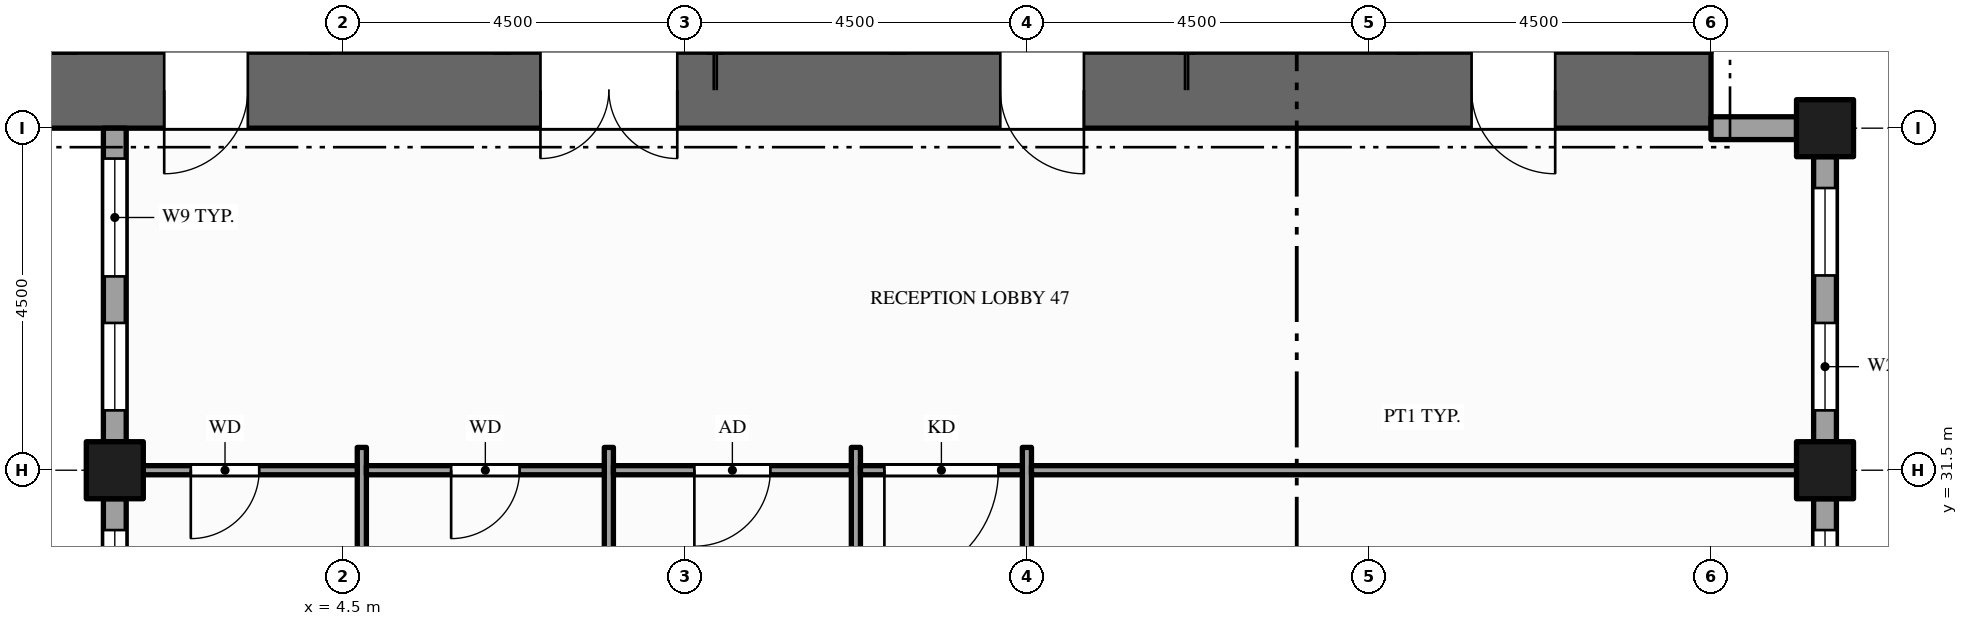
"""IFC4 building model, lengths in metres.
Left out: names, types, materials, properties, quantities, classifications, styles, units other than length and angle.
Written with IfcOpenShell. Run it as: python <this file> out.ifc"""

import sys

from ifc_helpers import new_model, si_unit, direction, frame, frame_2d, origin, origin_2d, place, context, subcontext, project, spatial, rectangle, hollow_rectangle, extrude, element, fill, save


model = new_model("IFC4")
c1 = context("Model", 3, precision=1e-05, world=origin(), true_north=direction((0.0, 1.0)))
c2 = subcontext(c1, "Body", "Model", "MODEL_VIEW")
j1 = project(units=[si_unit("LENGTHUNIT", "METRE"), si_unit("PLANEANGLEUNIT", "RADIAN")], contexts=[c1])
p1 = place(None, origin())
s1 = spatial("IfcSite", under=j1, at=p1, CompositionType="ELEMENT")
p2 = place(p1, origin())
s2 = spatial("IfcBuilding", under=s1, at=p2, CompositionType="ELEMENT")
p3 = place(p2, frame((0.0, 0.0, 211.0)))
s3 = spatial("IfcBuildingStorey", under=s2, at=p3, CompositionType="ELEMENT", Elevation=211.0)
p4 = place(p3, frame((0.0, 36.5, -0.15), z_axis=(0.0, 0.0, 1.0), x_axis=(1.0, 0.0, 0.0)))
e1 = element("IfcWall", 1, at=p4, inside=s3, PredefinedType="SHEAR", context=c2, shape_type="SweptSolid", body=[
    extrude(rectangle(XDim=22.5, YDim=1.0, at=frame_2d((11.25, 0.0))), origin(), (0.0, 0.0, 1.0), 4.0),
])
p5 = place(p4, frame((7.1, 0.0, 0.15)))
e2 = element("IfcOpeningElement", 2, at=p5, cuts=e1, PredefinedType="OPENING", context=c2, shape_type="SweptSolid", body=[
    extrude(rectangle(XDim=1.8, YDim=2.1, at=frame_2d((0.9, 1.05))), frame((0.0, 0.51, 0.0), z_axis=(0.0, -1.0, 0.0), x_axis=(1.0, 0.0, 0.0)), (0.0, 0.0, 1.0), 1.02),
])
p6 = place(p4, frame((13.15, 0.0, 0.15)))
e3 = element("IfcOpeningElement", 3, at=p6, cuts=e1, PredefinedType="OPENING", context=c2, shape_type="SweptSolid", body=[
    extrude(rectangle(XDim=1.1, YDim=2.1, at=frame_2d((0.55, 1.05))), frame((0.0, 0.51, 0.0), z_axis=(0.0, -1.0, 0.0), x_axis=(1.0, 0.0, 0.0)), (0.0, 0.0, 1.0), 1.02),
])
p7 = place(p4, frame((2.15, 0.0, 0.15)))
e4 = element("IfcOpeningElement", 4, at=p7, cuts=e1, PredefinedType="OPENING", context=c2, shape_type="SweptSolid", body=[
    extrude(rectangle(XDim=1.1, YDim=2.1, at=frame_2d((0.55, 1.05))), frame((0.0, 0.51, 0.0), z_axis=(0.0, -1.0, 0.0), x_axis=(1.0, 0.0, 0.0)), (0.0, 0.0, 1.0), 1.02),
])
p8 = place(p4, frame((19.35, 0.0, 0.15)))
e5 = element("IfcOpeningElement", 5, at=p8, cuts=e1, PredefinedType="OPENING", context=c2, shape_type="SweptSolid", body=[
    extrude(rectangle(XDim=1.1, YDim=2.1, at=frame_2d((0.55, 1.05))), frame((0.0, 0.51, 0.0), z_axis=(0.0, -1.0, 0.0), x_axis=(1.0, 0.0, 0.0)), (0.0, 0.0, 1.0), 1.02),
])
for number, where, z_axis, x_axis in (
    (6, (1.5, 31.5, -0.15), (0.0, 0.0, 1.0), (1.0, 0.0, 0.0)),
    (7, (24.0, 31.5, -0.15), (0.0, 0.0, 1.0), (1.0, 0.0, 0.0)),
    (8, (24.0, 36.0, -0.15), (0.0, 0.0, 1.0), (1.0, 0.0, 0.0)),
):
    element("IfcColumn", number, at=place(p3, frame(where, z_axis=z_axis, x_axis=x_axis)), inside=s3, PredefinedType="COLUMN", context=c2, shape_type="SweptSolid", body=[
        extrude(hollow_rectangle(XDim=0.75, YDim=0.75, WallThickness=0.036, at=origin_2d()), origin(), (0.0, 0.0, 1.0), 4.0),
    ])
p9 = place(p3, frame((24.0, 25.875, 0.0), z_axis=(0.0, 0.0, 1.0), x_axis=(0.0, 1.0, 0.0)))
e9 = element("IfcWall", 9, at=p9, inside=s3, PredefinedType="STANDARD", context=c2, shape_type="SweptSolid", body=[
    extrude(rectangle(XDim=5.25, YDim=0.3, at=frame_2d((2.625, 0.0))), origin(), (0.0, 0.0, 1.0), 3.157),
])
p10 = place(p9, frame((1.425, 0.0, 0.9)))
e10 = element("IfcOpeningElement", 10, at=p10, cuts=e9, PredefinedType="OPENING", context=c2, shape_type="SweptSolid", body=[
    extrude(rectangle(XDim=1.65, YDim=2.0, at=frame_2d((0.825, 1.0))), frame((0.0, 0.16, 0.0), z_axis=(0.0, -1.0, 0.0), x_axis=(1.0, 0.0, 0.0)), (0.0, 0.0, 1.0), 0.32),
])
p11 = place(p9, frame((3.688, 0.0, 0.9)))
e11 = element("IfcOpeningElement", 11, at=p11, cuts=e9, PredefinedType="OPENING", context=c2, shape_type="SweptSolid", body=[
    extrude(rectangle(XDim=1.15, YDim=2.0, at=frame_2d((0.575, 1.0))), frame((0.0, 0.16, 0.0), z_axis=(0.0, -1.0, 0.0), x_axis=(1.0, 0.0, 0.0)), (0.0, 0.0, 1.0), 0.32),
])
p12 = place(p3, frame((24.0, 31.875, 0.0), z_axis=(0.0, 0.0, 1.0), x_axis=(0.0, 1.0, 0.0)))
e12 = element("IfcWall", 12, at=p12, inside=s3, PredefinedType="STANDARD", context=c2, shape_type="SweptSolid", body=[
    extrude(rectangle(XDim=3.75, YDim=0.3, at=frame_2d((1.875, 0.0))), origin(), (0.0, 0.0, 1.0), 3.157),
])
p13 = place(p12, frame((0.413, 0.0, 0.9)))
e13 = element("IfcOpeningElement", 13, at=p13, cuts=e12, PredefinedType="OPENING", context=c2, shape_type="SweptSolid", body=[
    extrude(rectangle(XDim=1.15, YDim=2.0, at=frame_2d((0.575, 1.0))), frame((0.0, 0.16, 0.0), z_axis=(0.0, -1.0, 0.0), x_axis=(1.0, 0.0, 0.0)), (0.0, 0.0, 1.0), 0.32),
])
p14 = place(p12, frame((2.188, 0.0, 0.9)))
e14 = element("IfcOpeningElement", 14, at=p14, cuts=e12, PredefinedType="OPENING", context=c2, shape_type="SweptSolid", body=[
    extrude(rectangle(XDim=1.15, YDim=2.0, at=frame_2d((0.575, 1.0))), frame((0.0, 0.16, 0.0), z_axis=(0.0, -1.0, 0.0), x_axis=(1.0, 0.0, 0.0)), (0.0, 0.0, 1.0), 0.32),
])
p15 = place(p3, frame((23.625, 36.0, 0.0), z_axis=(0.0, 0.0, 1.0), x_axis=(-1.0, 0.0, 0.0)))
e15 = element("IfcWall", 15, at=p15, inside=s3, PredefinedType="STANDARD", context=c2, shape_type="SweptSolid", body=[
    extrude(rectangle(XDim=1.125, YDim=0.3, at=frame_2d((0.562, 0.0))), origin(), (0.0, 0.0, 1.0), 2.87),
])
p16 = place(p3, frame((1.5, 36.0, 0.0), z_axis=(0.0, 0.0, 1.0), x_axis=(0.0, -1.0, 0.0)))
e16 = element("IfcWall", 16, at=p16, inside=s3, PredefinedType="STANDARD", context=c2, shape_type="SweptSolid", body=[
    extrude(rectangle(XDim=4.125, YDim=0.3, at=frame_2d((2.062, 0.0))), origin(), (0.0, 0.0, 1.0), 3.157),
])
p17 = place(p16, frame((0.4, 0.0, 0.9)))
e17 = element("IfcOpeningElement", 17, at=p17, cuts=e16, PredefinedType="OPENING", context=c2, shape_type="SweptSolid", body=[
    extrude(rectangle(XDim=1.55, YDim=2.0, at=frame_2d((0.775, 1.0))), frame((0.0, 0.16, 0.0), z_axis=(0.0, -1.0, 0.0), x_axis=(1.0, 0.0, 0.0)), (0.0, 0.0, 1.0), 0.32),
])
p18 = place(p16, frame((2.562, 0.0, 0.9)))
e18 = element("IfcOpeningElement", 18, at=p18, cuts=e16, PredefinedType="OPENING", context=c2, shape_type="SweptSolid", body=[
    extrude(rectangle(XDim=1.15, YDim=2.0, at=frame_2d((0.575, 1.0))), frame((0.0, 0.16, 0.0), z_axis=(0.0, -1.0, 0.0), x_axis=(1.0, 0.0, 0.0)), (0.0, 0.0, 1.0), 0.32),
])
p19 = place(p3, frame((1.5, 31.125, 0.0), z_axis=(0.0, 0.0, 1.0), x_axis=(0.0, -1.0, 0.0)))
e19 = element("IfcWall", 19, at=p19, inside=s3, PredefinedType="STANDARD", context=c2, shape_type="SweptSolid", body=[
    extrude(rectangle(XDim=3.75, YDim=0.3, at=frame_2d((1.875, 0.0))), origin(), (0.0, 0.0, 1.0), 3.157),
])
p20 = place(p19, frame((0.413, 0.0, 0.9)))
e20 = element("IfcOpeningElement", 20, at=p20, cuts=e19, PredefinedType="OPENING", context=c2, shape_type="SweptSolid", body=[
    extrude(rectangle(XDim=1.15, YDim=2.0, at=frame_2d((0.575, 1.0))), frame((0.0, 0.16, 0.0), z_axis=(0.0, -1.0, 0.0), x_axis=(1.0, 0.0, 0.0)), (0.0, 0.0, 1.0), 0.32),
])
p21 = place(p19, frame((2.188, 0.0, 0.9)))
e21 = element("IfcOpeningElement", 21, at=p21, cuts=e19, PredefinedType="OPENING", context=c2, shape_type="SweptSolid", body=[
    extrude(rectangle(XDim=1.15, YDim=2.0, at=frame_2d((0.575, 1.0))), frame((0.0, 0.16, 0.0), z_axis=(0.0, -1.0, 0.0), x_axis=(1.0, 0.0, 0.0)), (0.0, 0.0, 1.0), 0.32),
])
for number, where, z_axis, x_axis in (
    (22, (4.75, 26.7, 0.0), (0.0, 0.0, 1.0), (0.0, 1.0, 0.0)),
    (23, (8.0, 26.7, 0.0), (0.0, 0.0, 1.0), (0.0, 1.0, 0.0)),
):
    element("IfcWall", number, at=place(p3, frame(where, z_axis=z_axis, x_axis=x_axis)), inside=s3, PredefinedType="PARTITIONING", context=c2, shape_type="SweptSolid", body=[
        extrude(rectangle(XDim=5.1, YDim=0.12, at=frame_2d((2.55, 0.0))), origin(), (0.0, 0.0, 1.0), 3.85),
    ])
p22 = place(p3, frame((11.25, 13.2, 0.0), z_axis=(0.0, 0.0, 1.0), x_axis=(0.0, 1.0, 0.0)))
e24 = element("IfcWall", 24, at=p22, inside=s3, PredefinedType="PARTITIONING", context=c2, shape_type="SweptSolid", body=[
    extrude(rectangle(XDim=18.6, YDim=0.12, at=frame_2d((9.3, 0.0))), origin(), (0.0, 0.0, 1.0), 2.6),
])
p23 = place(p22, frame((3.175, 0.0, 0.0)))
e25 = element("IfcOpeningElement", 25, at=p23, cuts=e24, PredefinedType="OPENING", context=c2, shape_type="SweptSolid", body=[
    extrude(rectangle(XDim=1.0, YDim=2.1, at=frame_2d((0.5, 1.05))), frame((0.0, 0.07, 0.0), z_axis=(0.0, -1.0, 0.0), x_axis=(1.0, 0.0, 0.0)), (0.0, 0.0, 1.0), 0.14),
])
p24 = place(p22, frame((9.955, 0.0, 0.0)))
e26 = element("IfcOpeningElement", 26, at=p24, cuts=e24, PredefinedType="OPENING", context=c2, shape_type="SweptSolid", body=[
    extrude(rectangle(XDim=1.0, YDim=2.1, at=frame_2d((0.5, 1.05))), frame((0.0, 0.07, 0.0), z_axis=(0.0, -1.0, 0.0), x_axis=(1.0, 0.0, 0.0)), (0.0, 0.0, 1.0), 0.14),
])
p25 = place(p3, frame((13.5, 13.2, 0.0), z_axis=(0.0, 0.0, 1.0), x_axis=(0.0, 1.0, 0.0)))
e27 = element("IfcWall", 27, at=p25, inside=s3, PredefinedType="PARTITIONING", context=c2, shape_type="SweptSolid", body=[
    extrude(rectangle(XDim=18.6, YDim=0.12, at=frame_2d((9.3, 0.0))), origin(), (0.0, 0.0, 1.0), 2.6),
])
p26 = place(p25, frame((4.2, 0.0, 0.0)))
e28 = element("IfcOpeningElement", 28, at=p26, cuts=e27, PredefinedType="OPENING", context=c2, shape_type="SweptSolid", body=[
    extrude(rectangle(XDim=1.2, YDim=2.1, at=frame_2d((0.6, 1.05))), frame((0.0, 0.07, 0.0), z_axis=(0.0, -1.0, 0.0), x_axis=(1.0, 0.0, 0.0)), (0.0, 0.0, 1.0), 0.14),
])
p27 = place(p3, frame((1.65, 31.5, 0.0), z_axis=(0.0, 0.0, 1.0), x_axis=(1.0, 0.0, 0.0)))
e29 = element("IfcWall", 29, at=p27, inside=s3, PredefinedType="PARTITIONING", context=c2, shape_type="SweptSolid", body=[
    extrude(rectangle(XDim=3.04, YDim=0.12, at=frame_2d((1.52, 0.0))), origin(), (0.0, 0.0, 1.0), 2.87),
])
p28 = place(p27, frame((0.85, 0.0, 0.0)))
e30 = element("IfcOpeningElement", 30, at=p28, cuts=e29, PredefinedType="OPENING", context=c2, shape_type="SweptSolid", body=[
    extrude(rectangle(XDim=0.9, YDim=2.1, at=frame_2d((0.45, 1.05))), frame((0.0, 0.07, 0.0), z_axis=(0.0, -1.0, 0.0), x_axis=(1.0, 0.0, 0.0)), (0.0, 0.0, 1.0), 0.14),
])
p29 = place(p3, frame((4.81, 31.5, 0.0), z_axis=(0.0, 0.0, 1.0), x_axis=(1.0, 0.0, 0.0)))
e31 = element("IfcWall", 31, at=p29, inside=s3, PredefinedType="PARTITIONING", context=c2, shape_type="SweptSolid", body=[
    extrude(rectangle(XDim=3.13, YDim=0.12, at=frame_2d((1.565, 0.0))), origin(), (0.0, 0.0, 1.0), 2.87),
])
p30 = place(p29, frame((1.115, 0.0, 0.0)))
e32 = element("IfcOpeningElement", 32, at=p30, cuts=e31, PredefinedType="OPENING", context=c2, shape_type="SweptSolid", body=[
    extrude(rectangle(XDim=0.9, YDim=2.1, at=frame_2d((0.45, 1.05))), frame((0.0, 0.07, 0.0), z_axis=(0.0, -1.0, 0.0), x_axis=(1.0, 0.0, 0.0)), (0.0, 0.0, 1.0), 0.14),
])
p31 = place(p3, frame((8.06, 31.5, 0.0), z_axis=(0.0, 0.0, 1.0), x_axis=(1.0, 0.0, 0.0)))
e33 = element("IfcWall", 33, at=p31, inside=s3, PredefinedType="PARTITIONING", context=c2, shape_type="SweptSolid", body=[
    extrude(rectangle(XDim=3.13, YDim=0.12, at=frame_2d((1.565, 0.0))), origin(), (0.0, 0.0, 1.0), 2.87),
])
p32 = place(p31, frame((1.065, 0.0, 0.0)))
e34 = element("IfcOpeningElement", 34, at=p32, cuts=e33, PredefinedType="OPENING", context=c2, shape_type="SweptSolid", body=[
    extrude(rectangle(XDim=1.0, YDim=2.1, at=frame_2d((0.5, 1.05))), frame((0.0, 0.07, 0.0), z_axis=(0.0, -1.0, 0.0), x_axis=(1.0, 0.0, 0.0)), (0.0, 0.0, 1.0), 0.14),
])
p33 = place(p3, frame((11.31, 31.5, 0.0), z_axis=(0.0, 0.0, 1.0), x_axis=(1.0, 0.0, 0.0)))
e35 = element("IfcWall", 35, at=p33, inside=s3, PredefinedType="PARTITIONING", context=c2, shape_type="SweptSolid", body=[
    extrude(rectangle(XDim=2.13, YDim=0.12, at=frame_2d((1.065, 0.0))), origin(), (0.0, 0.0, 1.0), 2.87),
])
p34 = place(p33, frame((0.315, 0.0, 0.0)))
e36 = element("IfcOpeningElement", 36, at=p34, cuts=e35, PredefinedType="OPENING", context=c2, shape_type="SweptSolid", body=[
    extrude(rectangle(XDim=1.5, YDim=2.1, at=frame_2d((0.75, 1.05))), frame((0.0, 0.07, 0.0), z_axis=(0.0, -1.0, 0.0), x_axis=(1.0, 0.0, 0.0)), (0.0, 0.0, 1.0), 0.14),
])
p35 = place(p3, frame((13.56, 31.5, 0.0), z_axis=(0.0, 0.0, 1.0), x_axis=(1.0, 0.0, 0.0)))
e37 = element("IfcWall", 37, at=p35, inside=s3, PredefinedType="PARTITIONING", context=c2, shape_type="SweptSolid", body=[
    extrude(rectangle(XDim=10.29, YDim=0.12, at=frame_2d((5.145, 0.0))), origin(), (0.0, 0.0, 1.0), 2.87),
])
p36 = place(p11, origin())
e38 = element("IfcWindow", 38, at=p36, inside=s3, PartitioningType="SINGLE_PANEL", PredefinedType="WINDOW", context=c2, shape_type="SweptSolid", body=[
    extrude(rectangle(XDim=1.15, YDim=2.0, at=frame_2d((0.575, 1.0))), frame((0.0, 0.03, 0.0), z_axis=(0.0, -1.0, 0.0), x_axis=(1.0, 0.0, 0.0)), (0.0, 0.0, 1.0), 0.06),
])
fill(e11, e38)
p37 = place(p13, origin())
e39 = element("IfcWindow", 39, at=p37, inside=s3, PartitioningType="SINGLE_PANEL", PredefinedType="WINDOW", context=c2, shape_type="SweptSolid", body=[
    extrude(rectangle(XDim=1.15, YDim=2.0, at=frame_2d((0.575, 1.0))), frame((0.0, 0.03, 0.0), z_axis=(0.0, -1.0, 0.0), x_axis=(1.0, 0.0, 0.0)), (0.0, 0.0, 1.0), 0.06),
])
fill(e13, e39)
p38 = place(p14, origin())
e40 = element("IfcWindow", 40, at=p38, inside=s3, PartitioningType="SINGLE_PANEL", PredefinedType="WINDOW", context=c2, shape_type="SweptSolid", body=[
    extrude(rectangle(XDim=1.15, YDim=2.0, at=frame_2d((0.575, 1.0))), frame((0.0, 0.03, 0.0), z_axis=(0.0, -1.0, 0.0), x_axis=(1.0, 0.0, 0.0)), (0.0, 0.0, 1.0), 0.06),
])
fill(e14, e40)
p39 = place(p17, origin())
e41 = element("IfcWindow", 41, at=p39, inside=s3, PartitioningType="SINGLE_PANEL", PredefinedType="WINDOW", context=c2, shape_type="SweptSolid", body=[
    extrude(rectangle(XDim=1.55, YDim=2.0, at=frame_2d((0.775, 1.0))), frame((0.0, 0.03, 0.0), z_axis=(0.0, -1.0, 0.0), x_axis=(1.0, 0.0, 0.0)), (0.0, 0.0, 1.0), 0.06),
])
fill(e17, e41)
p40 = place(p18, origin())
e42 = element("IfcWindow", 42, at=p40, inside=s3, PartitioningType="SINGLE_PANEL", PredefinedType="WINDOW", context=c2, shape_type="SweptSolid", body=[
    extrude(rectangle(XDim=1.15, YDim=2.0, at=frame_2d((0.575, 1.0))), frame((0.0, 0.03, 0.0), z_axis=(0.0, -1.0, 0.0), x_axis=(1.0, 0.0, 0.0)), (0.0, 0.0, 1.0), 0.06),
])
fill(e18, e42)
p41 = place(p20, origin())
e43 = element("IfcWindow", 43, at=p41, inside=s3, PartitioningType="SINGLE_PANEL", PredefinedType="WINDOW", context=c2, shape_type="SweptSolid", body=[
    extrude(rectangle(XDim=1.15, YDim=2.0, at=frame_2d((0.575, 1.0))), frame((0.0, 0.03, 0.0), z_axis=(0.0, -1.0, 0.0), x_axis=(1.0, 0.0, 0.0)), (0.0, 0.0, 1.0), 0.06),
])
fill(e20, e43)
p42 = place(p5, origin())
e44 = element("IfcDoor", 44, at=p42, inside=s3, OperationType="DOUBLE_DOOR_SINGLE_SWING", PredefinedType="DOOR", context=c2, shape_type="SweptSolid", body=[
    extrude(rectangle(XDim=1.8, YDim=2.1, at=frame_2d((0.9, 1.05))), frame((0.0, 0.025, 0.0), z_axis=(0.0, -1.0, 0.0), x_axis=(1.0, 0.0, 0.0)), (0.0, 0.0, 1.0), 0.05),
])
fill(e2, e44)
p43 = place(p6, origin())
e45 = element("IfcDoor", 45, at=p43, inside=s3, OperationType="SINGLE_SWING_RIGHT", PredefinedType="DOOR", context=c2, shape_type="SweptSolid", body=[
    extrude(rectangle(XDim=1.1, YDim=2.1, at=frame_2d((0.55, 1.05))), frame((0.0, 0.025, 0.0), z_axis=(0.0, -1.0, 0.0), x_axis=(1.0, 0.0, 0.0)), (0.0, 0.0, 1.0), 0.05),
])
fill(e3, e45)
p44 = place(p7, origin())
e46 = element("IfcDoor", 46, at=p44, inside=s3, OperationType="SINGLE_SWING_LEFT", PredefinedType="DOOR", context=c2, shape_type="SweptSolid", body=[
    extrude(rectangle(XDim=1.1, YDim=2.1, at=frame_2d((0.55, 1.05))), frame((0.0, 0.025, 0.0), z_axis=(0.0, -1.0, 0.0), x_axis=(1.0, 0.0, 0.0)), (0.0, 0.0, 1.0), 0.05),
])
fill(e4, e46)
p45 = place(p8, origin())
e47 = element("IfcDoor", 47, at=p45, inside=s3, OperationType="SINGLE_SWING_RIGHT", PredefinedType="DOOR", context=c2, shape_type="SweptSolid", body=[
    extrude(rectangle(XDim=1.1, YDim=2.1, at=frame_2d((0.55, 1.05))), frame((0.0, 0.025, 0.0), z_axis=(0.0, -1.0, 0.0), x_axis=(1.0, 0.0, 0.0)), (0.0, 0.0, 1.0), 0.05),
])
fill(e5, e47)
p46 = place(p34, origin())
e48 = element("IfcDoor", 48, at=p46, inside=s3, OperationType="SINGLE_SWING_LEFT", PredefinedType="DOOR", context=c2, shape_type="SweptSolid", body=[
    extrude(rectangle(XDim=1.5, YDim=2.1, at=frame_2d((0.75, 1.05))), frame((0.0, 0.025, 0.0), z_axis=(0.0, -1.0, 0.0), x_axis=(1.0, 0.0, 0.0)), (0.0, 0.0, 1.0), 0.05),
])
fill(e36, e48)
p47 = place(p28, origin())
e49 = element("IfcDoor", 49, at=p47, inside=s3, OperationType="SINGLE_SWING_LEFT", PredefinedType="DOOR", context=c2, shape_type="SweptSolid", body=[
    extrude(rectangle(XDim=0.9, YDim=2.1, at=frame_2d((0.45, 1.05))), frame((0.0, 0.025, 0.0), z_axis=(0.0, -1.0, 0.0), x_axis=(1.0, 0.0, 0.0)), (0.0, 0.0, 1.0), 0.05),
])
fill(e30, e49)
p48 = place(p30, origin())
e50 = element("IfcDoor", 50, at=p48, inside=s3, OperationType="SINGLE_SWING_LEFT", PredefinedType="DOOR", context=c2, shape_type="SweptSolid", body=[
    extrude(rectangle(XDim=0.9, YDim=2.1, at=frame_2d((0.45, 1.05))), frame((0.0, 0.025, 0.0), z_axis=(0.0, -1.0, 0.0), x_axis=(1.0, 0.0, 0.0)), (0.0, 0.0, 1.0), 0.05),
])
fill(e32, e50)
p49 = place(p32, origin())
e51 = element("IfcDoor", 51, at=p49, inside=s3, OperationType="SINGLE_SWING_LEFT", PredefinedType="DOOR", context=c2, shape_type="SweptSolid", body=[
    extrude(rectangle(XDim=1.0, YDim=2.1, at=frame_2d((0.5, 1.05))), frame((0.0, 0.025, 0.0), z_axis=(0.0, -1.0, 0.0), x_axis=(1.0, 0.0, 0.0)), (0.0, 0.0, 1.0), 0.05),
])
fill(e34, e51)
save(model, sys.argv[1])
